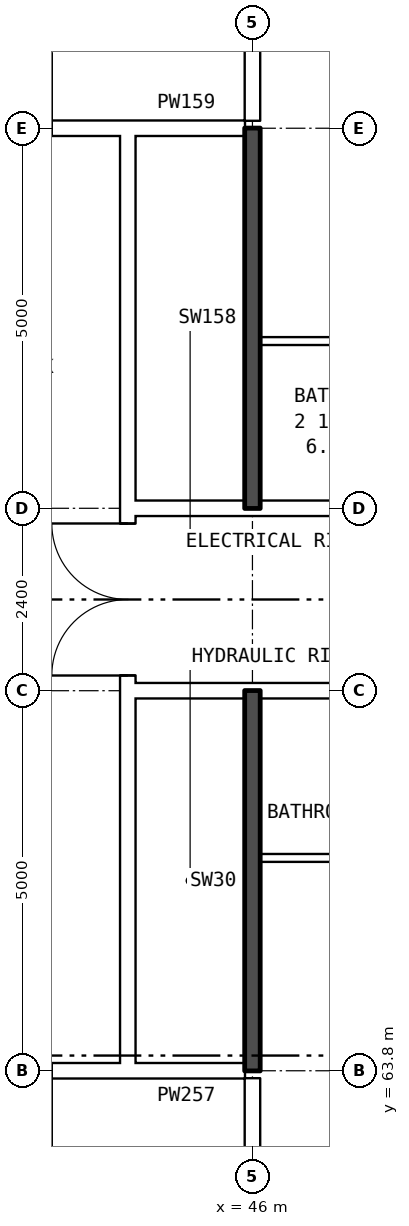
"""IFC4 building model, lengths in metres.
Left out: names, types, materials, properties, quantities, classifications, styles, units other than length and angle.
Written with IfcOpenShell. Run it as: python <this file> out.ifc"""

import sys

from ifc_helpers import new_model, si_unit, direction, frame, frame_2d, origin, place, context, subcontext, project, spatial, rectangle, extrude, element, fill, save


model = new_model("IFC4")
c1 = context("Model", 3, precision=1e-05, world=origin(), true_north=direction((0.0, 1.0)))
c2 = subcontext(c1, "Body", "Model", "MODEL_VIEW")
j1 = project(units=[si_unit("LENGTHUNIT", "METRE"), si_unit("PLANEANGLEUNIT", "RADIAN")], contexts=[c1])
p1 = place(None, origin())
s1 = spatial("IfcSite", under=j1, at=p1, CompositionType="ELEMENT")
p2 = place(p1, origin())
s2 = spatial("IfcBuilding", under=s1, at=p2, CompositionType="ELEMENT")
p3 = place(p2, frame((0.0, 0.0, 50.5)))
s3 = spatial("IfcBuildingStorey", under=s2, at=p3, CompositionType="ELEMENT", Elevation=50.5)
p4 = place(p3, frame((44.36, 63.9, 0.0), z_axis=(0.0, 0.0, 1.0), x_axis=(0.0, 1.0, 0.0)))
e1 = element("IfcWall", 1, at=p4, inside=s3, PredefinedType="PARTITIONING", context=c2, shape_type="SweptSolid", body=[
    extrude(rectangle(XDim=12.2, YDim=0.2, at=frame_2d((6.1, 0.0))), origin(), (0.0, 0.0, 1.0), 2.85),
])
p5 = place(p4, frame((5.1, 0.0, 0.0)))
e2 = element("IfcOpeningElement", 2, at=p5, cuts=e1, PredefinedType="OPENING", context=c2, shape_type="SweptSolid", body=[
    extrude(rectangle(XDim=2.0, YDim=2.1, at=frame_2d((1.0, 1.05))), frame((0.0, 0.11, 0.0), z_axis=(0.0, -1.0, 0.0), x_axis=(1.0, 0.0, 0.0)), (0.0, 0.0, 1.0), 0.22),
])
p6 = place(p3, frame((41.36, 63.8, 0.0), z_axis=(0.0, 0.0, 1.0), x_axis=(1.0, 0.0, 0.0)))
e3 = element("IfcWall", 3, at=p6, inside=s3, PredefinedType="PARTITIONING", context=c2, shape_type="SweptSolid", body=[
    extrude(rectangle(XDim=3.0, YDim=0.2, at=frame_2d((1.5, 0.0))), origin(), (0.0, 0.0, 1.0), 2.85),
])
p7 = place(p6, frame((1.0, 0.0, 0.0)))
e4 = element("IfcOpeningElement", 4, at=p7, cuts=e3, PredefinedType="OPENING", context=c2, shape_type="SweptSolid", body=[
    extrude(rectangle(XDim=1.0, YDim=2.1, at=frame_2d((0.5, 1.05))), frame((0.0, 0.11, 0.0), z_axis=(0.0, -1.0, 0.0), x_axis=(1.0, 0.0, 0.0)), (0.0, 0.0, 1.0), 0.22),
])
p8 = place(p3, frame((44.36, 63.8, 0.0), z_axis=(0.0, 0.0, 1.0), x_axis=(1.0, 0.0, 0.0)))
e5 = element("IfcWall", 5, at=p8, inside=s3, PredefinedType="PARTITIONING", context=c2, shape_type="SweptSolid", body=[
    extrude(rectangle(XDim=1.54, YDim=0.2, at=frame_2d((0.77, 0.0))), origin(), (0.0, 0.0, 1.0), 2.85),
])
p9 = place(p3, frame((46.1, 66.6, 0.0), z_axis=(0.0, 0.0, 1.0), x_axis=(1.0, 0.0, 0.0)))
e6 = element("IfcWall", 6, at=p9, inside=s3, PredefinedType="PARTITIONING", context=c2, shape_type="SweptSolid", body=[
    extrude(rectangle(XDim=2.9, YDim=0.1, at=frame_2d((1.45, 0.0))), origin(), (0.0, 0.0, 1.0), 2.85),
])
p10 = place(p3, frame((44.36, 68.8, 0.0), z_axis=(0.0, 0.0, 1.0), x_axis=(1.0, 0.0, 0.0)))
e7 = element("IfcWall", 7, at=p10, inside=s3, PredefinedType="PARTITIONING", context=c2, shape_type="SweptSolid", body=[
    extrude(rectangle(XDim=19.28, YDim=0.2, at=frame_2d((9.64, 0.0))), origin(), (0.0, 0.0, 1.0), 2.85),
])
p11 = place(p10, frame((14.64, 0.0, 0.0)))
e8 = element("IfcOpeningElement", 8, at=p11, cuts=e7, PredefinedType="OPENING", context=c2, shape_type="SweptSolid", body=[
    extrude(rectangle(XDim=1.0, YDim=2.1, at=frame_2d((0.5, 1.05))), frame((0.0, 0.11, 0.0), z_axis=(0.0, -1.0, 0.0), x_axis=(1.0, 0.0, 0.0)), (0.0, 0.0, 1.0), 0.22),
])
p12 = place(p10, frame((5.64, 0.0, 0.0)))
e9 = element("IfcOpeningElement", 9, at=p12, cuts=e7, PredefinedType="OPENING", context=c2, shape_type="SweptSolid", body=[
    extrude(rectangle(XDim=1.0, YDim=2.1, at=frame_2d((0.5, 1.05))), frame((0.0, 0.11, 0.0), z_axis=(0.0, -1.0, 0.0), x_axis=(1.0, 0.0, 0.0)), (0.0, 0.0, 1.0), 0.22),
])
p13 = place(p3, frame((44.36, 71.2, 0.0), z_axis=(0.0, 0.0, 1.0), x_axis=(1.0, 0.0, 0.0)))
e10 = element("IfcWall", 10, at=p13, inside=s3, PredefinedType="PARTITIONING", context=c2, shape_type="SweptSolid", body=[
    extrude(rectangle(XDim=19.28, YDim=0.2, at=frame_2d((9.64, 0.0))), origin(), (0.0, 0.0, 1.0), 2.85),
])
p14 = place(p13, frame((14.64, 0.0, 0.0)))
e11 = element("IfcOpeningElement", 11, at=p14, cuts=e10, PredefinedType="OPENING", context=c2, shape_type="SweptSolid", body=[
    extrude(rectangle(XDim=1.0, YDim=2.1, at=frame_2d((0.5, 1.05))), frame((0.0, 0.11, 0.0), z_axis=(0.0, -1.0, 0.0), x_axis=(1.0, 0.0, 0.0)), (0.0, 0.0, 1.0), 0.22),
])
p15 = place(p13, frame((5.64, 0.0, 0.0)))
e12 = element("IfcOpeningElement", 12, at=p15, cuts=e10, PredefinedType="OPENING", context=c2, shape_type="SweptSolid", body=[
    extrude(rectangle(XDim=1.0, YDim=2.1, at=frame_2d((0.5, 1.05))), frame((0.0, 0.11, 0.0), z_axis=(0.0, -1.0, 0.0), x_axis=(1.0, 0.0, 0.0)), (0.0, 0.0, 1.0), 0.22),
])
p16 = place(p3, frame((46.1, 73.4, 0.0), z_axis=(0.0, 0.0, 1.0), x_axis=(1.0, 0.0, 0.0)))
e13 = element("IfcWall", 13, at=p16, inside=s3, PredefinedType="PARTITIONING", context=c2, shape_type="SweptSolid", body=[
    extrude(rectangle(XDim=2.9, YDim=0.1, at=frame_2d((1.45, 0.0))), origin(), (0.0, 0.0, 1.0), 2.85),
])
p17 = place(p3, frame((41.36, 76.2, 0.0), z_axis=(0.0, 0.0, 1.0), x_axis=(1.0, 0.0, 0.0)))
e14 = element("IfcWall", 14, at=p17, inside=s3, PredefinedType="PARTITIONING", context=c2, shape_type="SweptSolid", body=[
    extrude(rectangle(XDim=3.0, YDim=0.2, at=frame_2d((1.5, 0.0))), origin(), (0.0, 0.0, 1.0), 2.85),
])
p18 = place(p17, frame((1.0, 0.0, 0.0)))
e15 = element("IfcOpeningElement", 15, at=p18, cuts=e14, PredefinedType="OPENING", context=c2, shape_type="SweptSolid", body=[
    extrude(rectangle(XDim=1.0, YDim=2.1, at=frame_2d((0.5, 1.05))), frame((0.0, 0.11, 0.0), z_axis=(0.0, -1.0, 0.0), x_axis=(1.0, 0.0, 0.0)), (0.0, 0.0, 1.0), 0.22),
])
p19 = place(p3, frame((44.36, 76.2, 0.0), z_axis=(0.0, 0.0, 1.0), x_axis=(1.0, 0.0, 0.0)))
e16 = element("IfcWall", 16, at=p19, inside=s3, PredefinedType="PARTITIONING", context=c2, shape_type="SweptSolid", body=[
    extrude(rectangle(XDim=1.54, YDim=0.2, at=frame_2d((0.77, 0.0))), origin(), (0.0, 0.0, 1.0), 2.85),
])
p20 = place(p3, frame((46.0, 61.5, 0.0), z_axis=(0.0, 0.0, 1.0), x_axis=(0.0, 1.0, 0.0)))
e17 = element("IfcWall", 17, at=p20, inside=s3, PredefinedType="PARTITIONING", context=c2, shape_type="SweptSolid", body=[
    extrude(rectangle(XDim=2.2, YDim=0.2, at=frame_2d((1.1, 0.0))), origin(), (0.0, 0.0, 1.0), 2.85),
])
for number, where, z_axis, x_axis in (
    (18, (46.0, 63.8, 0.0), (0.0, 0.0, 1.0), (0.0, 1.0, 0.0)),
    (19, (46.0, 71.2, 0.0), (0.0, 0.0, 1.0), (0.0, 1.0, 0.0)),
):
    element("IfcWall", number, at=place(p3, frame(where, z_axis=z_axis, x_axis=x_axis)), inside=s3, PredefinedType="SOLIDWALL", context=c2, shape_type="SweptSolid", body=[
        extrude(rectangle(XDim=5.0, YDim=0.2, at=frame_2d((2.5, 0.0))), origin(), (0.0, 0.0, 1.0), 2.85),
    ])
p21 = place(p3, frame((46.0, 76.3, 0.0), z_axis=(0.0, 0.0, 1.0), x_axis=(0.0, 1.0, 0.0)))
e20 = element("IfcWall", 20, at=p21, inside=s3, PredefinedType="PARTITIONING", context=c2, shape_type="SweptSolid", body=[
    extrude(rectangle(XDim=2.2, YDim=0.2, at=frame_2d((1.1, 0.0))), origin(), (0.0, 0.0, 1.0), 2.85),
])
p22 = place(p5, origin())
e21 = element("IfcDoor", 21, at=p22, inside=s3, OperationType="DOUBLE_DOOR_SINGLE_SWING", PredefinedType="DOOR", context=c2, shape_type="SweptSolid", body=[
    extrude(rectangle(XDim=2.0, YDim=2.1, at=frame_2d((1.0, 1.05))), frame((0.0, 0.025, 0.0), z_axis=(0.0, -1.0, 0.0), x_axis=(1.0, 0.0, 0.0)), (0.0, 0.0, 1.0), 0.05),
])
fill(e2, e21)
save(model, sys.argv[1])
